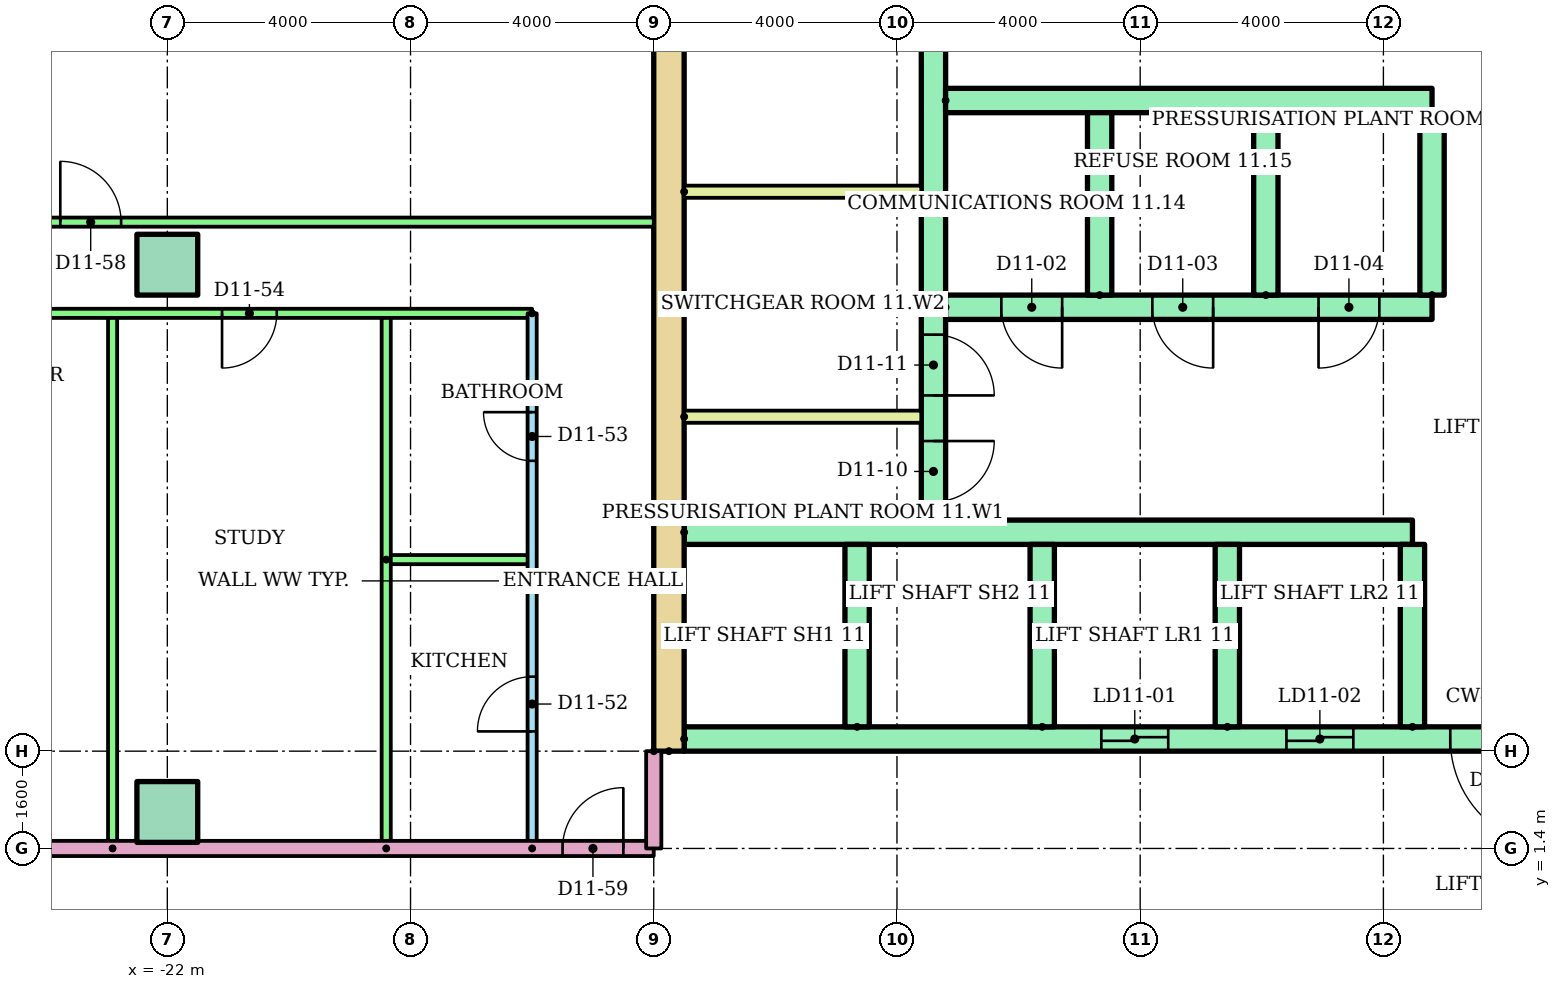
"""IFC4 building model, lengths in metres.
Left out: names, types, materials, properties, quantities, classifications, styles, units other than length and angle.
Written with IfcOpenShell. Run it as: python <this file> out.ifc"""

import sys

from ifc_helpers import new_model, si_unit, direction, frame, frame_2d, origin, origin_2d, place, context, subcontext, project, spatial, rectangle, extrude, element, fill, save


model = new_model("IFC4")
c1 = context("Model", 3, precision=1e-05, world=origin(), true_north=direction((0.0, 1.0)))
c2 = subcontext(c1, "Body", "Model", "MODEL_VIEW")
j1 = project(units=[si_unit("LENGTHUNIT", "METRE"), si_unit("PLANEANGLEUNIT", "RADIAN")], contexts=[c1])
p1 = place(None, origin())
s1 = spatial("IfcSite", under=j1, at=p1, CompositionType="ELEMENT")
p2 = place(p1, origin())
s2 = spatial("IfcBuilding", under=s1, at=p2, CompositionType="ELEMENT")
p3 = place(p2, frame((0.0, 0.0, 44.8)))
s3 = spatial("IfcBuildingStorey", under=s2, at=p3, CompositionType="ELEMENT", Elevation=44.8)
for number, where in (
    (1, (-22.0, 2.0, 0.0)),
    (2, (-22.0, 11.0, 0.0)),
):
    element("IfcColumn", number, at=place(p3, frame(where)), inside=s3, PredefinedType="COLUMN", context=c2, shape_type="SweptSolid", body=[
        extrude(rectangle(XDim=1.0, YDim=1.0, at=origin_2d()), origin(), (0.0, 0.0, 1.0), 3.2),
    ])
p4 = place(p3, frame((-13.75, 3.0, 0.0), z_axis=(0.0, 0.0, 1.0), x_axis=(0.0, 1.0, 0.0)))
e3 = element("IfcWall", 3, at=p4, inside=s3, PredefinedType="SHEAR", context=c2, shape_type="SweptSolid", body=[
    extrude(rectangle(XDim=17.0, YDim=0.5, at=frame_2d((8.5, 0.0))), origin(), (0.0, 0.0, 1.0), 2.92),
])
p5 = place(p3, frame((-9.4, 6.8, 0.0), z_axis=(0.0, 0.0, 1.0), x_axis=(0.0, 1.0, 0.0)))
e4 = element("IfcWall", 4, at=p5, inside=s3, PredefinedType="SHEAR", context=c2, shape_type="SweptSolid", body=[
    extrude(rectangle(XDim=12.7, YDim=0.4, at=frame_2d((6.35, 0.0))), origin(), (0.0, 0.0, 1.0), 2.92),
])
p6 = place(p5, frame((0.3, 0.0, 0.0)))
e5 = element("IfcOpeningElement", 5, at=p6, cuts=e4, PredefinedType="OPENING", context=c2, shape_type="SweptSolid", body=[
    extrude(rectangle(XDim=1.0, YDim=2.1, at=frame_2d((0.5, 1.05))), frame((0.0, 0.21, 0.0), z_axis=(0.0, -1.0, 0.0), x_axis=(1.0, 0.0, 0.0)), (0.0, 0.0, 1.0), 0.42),
])
p7 = place(p5, frame((2.05, 0.0, 0.0)))
e6 = element("IfcOpeningElement", 6, at=p7, cuts=e4, PredefinedType="OPENING", context=c2, shape_type="SweptSolid", body=[
    extrude(rectangle(XDim=1.0, YDim=2.1, at=frame_2d((0.5, 1.05))), frame((0.0, 0.21, 0.0), z_axis=(0.0, -1.0, 0.0), x_axis=(1.0, 0.0, 0.0)), (0.0, 0.0, 1.0), 0.42),
])
p8 = place(p5, frame((7.925, 0.0, 0.0)))
e7 = element("IfcOpeningElement", 7, at=p8, cuts=e4, PredefinedType="OPENING", context=c2, shape_type="SweptSolid", body=[
    extrude(rectangle(XDim=1.0, YDim=2.1, at=frame_2d((0.5, 1.05))), frame((0.0, 0.21, 0.0), z_axis=(0.0, -1.0, 0.0), x_axis=(1.0, 0.0, 0.0)), (0.0, 0.0, 1.0), 0.42),
])
p9 = place(p3, frame((-13.5, 3.2, 0.0)))
e8 = element("IfcWall", 8, at=p9, inside=s3, PredefinedType="SHEAR", context=c2, shape_type="SweptSolid", body=[
    extrude(rectangle(XDim=27.0, YDim=0.4, at=frame_2d((13.5, 0.0))), origin(), (0.0, 0.0, 1.0), 2.92),
])
p10 = place(p9, frame((6.861, 0.0, 0.0)))
e9 = element("IfcOpeningElement", 9, at=p10, cuts=e8, PredefinedType="OPENING", context=c2, shape_type="SweptSolid", body=[
    extrude(rectangle(XDim=1.1, YDim=2.1, at=frame_2d((0.55, 1.05))), frame((0.0, 0.21, 0.0), z_axis=(0.0, -1.0, 0.0), x_axis=(1.0, 0.0, 0.0)), (0.0, 0.0, 1.0), 0.42),
])
p11 = place(p9, frame((9.906, 0.0, 0.0)))
e10 = element("IfcOpeningElement", 10, at=p11, cuts=e8, PredefinedType="OPENING", context=c2, shape_type="SweptSolid", body=[
    extrude(rectangle(XDim=1.1, YDim=2.1, at=frame_2d((0.55, 1.05))), frame((0.0, 0.21, 0.0), z_axis=(0.0, -1.0, 0.0), x_axis=(1.0, 0.0, 0.0)), (0.0, 0.0, 1.0), 0.42),
])
p12 = place(p9, frame((15.994, 0.0, 0.0)))
e11 = element("IfcOpeningElement", 11, at=p12, cuts=e8, PredefinedType="OPENING", context=c2, shape_type="SweptSolid", body=[
    extrude(rectangle(XDim=1.1, YDim=2.1, at=frame_2d((0.55, 1.05))), frame((0.0, 0.21, 0.0), z_axis=(0.0, -1.0, 0.0), x_axis=(1.0, 0.0, 0.0)), (0.0, 0.0, 1.0), 0.42),
])
p13 = place(p9, frame((19.039, 0.0, 0.0)))
e12 = element("IfcOpeningElement", 12, at=p13, cuts=e8, PredefinedType="OPENING", context=c2, shape_type="SweptSolid", body=[
    extrude(rectangle(XDim=1.1, YDim=2.1, at=frame_2d((0.55, 1.05))), frame((0.0, 0.21, 0.0), z_axis=(0.0, -1.0, 0.0), x_axis=(1.0, 0.0, 0.0)), (0.0, 0.0, 1.0), 0.42),
])
p14 = place(p9, frame((12.6, 0.0, 0.0)))
e13 = element("IfcOpeningElement", 13, at=p14, cuts=e8, PredefinedType="OPENING", context=c2, shape_type="SweptSolid", body=[
    extrude(rectangle(XDim=1.8, YDim=2.1, at=frame_2d((0.9, 1.05))), frame((0.0, 0.21, 0.0), z_axis=(0.0, -1.0, 0.0), x_axis=(1.0, 0.0, 0.0)), (0.0, 0.0, 1.0), 0.42),
])
p15 = place(p3, frame((-13.5, 6.6, 0.0)))
e14 = element("IfcWall", 14, at=p15, inside=s3, PredefinedType="SHEAR", context=c2, shape_type="SweptSolid", body=[
    extrude(rectangle(XDim=11.978, YDim=0.4, at=frame_2d((5.989, 0.0))), origin(), (0.0, 0.0, 1.0), 2.92),
])
for number, where, z_axis, x_axis in (
    (15, (-10.656, 3.4, 0.0), (0.0, 0.0, 1.0), (0.0, 1.0, 0.0)),
    (16, (-7.611, 3.4, 0.0), (0.0, 0.0, 1.0), (0.0, 1.0, 0.0)),
    (17, (-4.567, 3.4, 0.0), (0.0, 0.0, 1.0), (0.0, 1.0, 0.0)),
    (18, (-1.522, 3.4, 0.0), (0.0, 0.0, 1.0), (0.0, 1.0, 0.0)),
):
    element("IfcWall", number, at=place(p3, frame(where, z_axis=z_axis, x_axis=x_axis)), inside=s3, PredefinedType="SHEAR", context=c2, shape_type="SweptSolid", body=[
        extrude(rectangle(XDim=3.0, YDim=0.4, at=frame_2d((1.5, 0.0))), origin(), (0.0, 0.0, 1.0), 2.92),
    ])
p16 = place(p3, frame((-9.2, 10.3, 0.0)))
e19 = element("IfcWall", 19, at=p16, inside=s3, PredefinedType="SHEAR", context=c2, shape_type="SweptSolid", body=[
    extrude(rectangle(XDim=8.0, YDim=0.4, at=frame_2d((4.0, 0.0))), origin(), (0.0, 0.0, 1.0), 2.92),
])
p17 = place(p16, frame((0.917, 0.0, 0.0)))
e20 = element("IfcOpeningElement", 20, at=p17, cuts=e19, PredefinedType="OPENING", context=c2, shape_type="SweptSolid", body=[
    extrude(rectangle(XDim=1.0, YDim=2.1, at=frame_2d((0.5, 1.05))), frame((0.0, 0.21, 0.0), z_axis=(0.0, -1.0, 0.0), x_axis=(1.0, 0.0, 0.0)), (0.0, 0.0, 1.0), 0.42),
])
p18 = place(p16, frame((3.4, 0.0, 0.0)))
e21 = element("IfcOpeningElement", 21, at=p18, cuts=e19, PredefinedType="OPENING", context=c2, shape_type="SweptSolid", body=[
    extrude(rectangle(XDim=1.0, YDim=2.1, at=frame_2d((0.5, 1.05))), frame((0.0, 0.21, 0.0), z_axis=(0.0, -1.0, 0.0), x_axis=(1.0, 0.0, 0.0)), (0.0, 0.0, 1.0), 0.42),
])
p19 = place(p16, frame((6.133, 0.0, 0.0)))
e22 = element("IfcOpeningElement", 22, at=p19, cuts=e19, PredefinedType="OPENING", context=c2, shape_type="SweptSolid", body=[
    extrude(rectangle(XDim=1.0, YDim=2.1, at=frame_2d((0.5, 1.05))), frame((0.0, 0.21, 0.0), z_axis=(0.0, -1.0, 0.0), x_axis=(1.0, 0.0, 0.0)), (0.0, 0.0, 1.0), 0.42),
])
p20 = place(p3, frame((-9.2, 13.7, 0.0)))
e23 = element("IfcWall", 23, at=p20, inside=s3, PredefinedType="SHEAR", context=c2, shape_type="SweptSolid", body=[
    extrude(rectangle(XDim=8.0, YDim=0.4, at=frame_2d((4.0, 0.0))), origin(), (0.0, 0.0, 1.0), 2.92),
])
for number, where, z_axis, x_axis in (
    (24, (-6.667, 10.5, 0.0), (0.0, 0.0, 1.0), (0.0, 1.0, 0.0)),
    (25, (-3.933, 10.5, 0.0), (0.0, 0.0, 1.0), (0.0, 1.0, 0.0)),
    (26, (-1.2, 10.5, 0.0), (0.0, 0.0, 1.0), (0.0, 1.0, 0.0)),
):
    element("IfcWall", number, at=place(p3, frame(where, z_axis=z_axis, x_axis=x_axis)), inside=s3, PredefinedType="SHEAR", context=c2, shape_type="SweptSolid", body=[
        extrude(rectangle(XDim=3.0, YDim=0.4, at=frame_2d((1.5, 0.0))), origin(), (0.0, 0.0, 1.0), 2.92),
    ])
for number, where in (
    (27, (-13.5, 8.5, 0.0)),
    (28, (-13.5, 12.2, 0.0)),
):
    element("IfcWall", number, at=place(p3, frame(where)), inside=s3, PredefinedType="PARTITIONING", context=c2, shape_type="SweptSolid", body=[
        extrude(rectangle(XDim=3.9, YDim=0.2, at=frame_2d((1.95, 0.0))), origin(), (0.0, 0.0, 1.0), 2.92),
    ])
p21 = place(p3, frame((-16.0, 1.4, 0.0), z_axis=(0.0, 0.0, 1.0), x_axis=(0.0, 1.0, 0.0)))
e29 = element("IfcWall", 29, at=p21, inside=s3, PredefinedType="PARTITIONING", context=c2, shape_type="SweptSolid", body=[
    extrude(rectangle(XDim=8.8, YDim=0.15, at=frame_2d((4.4, 0.0))), origin(), (0.0, 0.0, 1.0), 2.4),
])
p22 = place(p21, frame((1.925, 0.0, 0.0)))
e30 = element("IfcOpeningElement", 30, at=p22, cuts=e29, PredefinedType="OPENING", context=c2, shape_type="SweptSolid", body=[
    extrude(rectangle(XDim=0.9, YDim=2.1, at=frame_2d((0.45, 1.05))), frame((0.0, 0.085, 0.0), z_axis=(0.0, -1.0, 0.0), x_axis=(1.0, 0.0, 0.0)), (0.0, 0.0, 1.0), 0.17),
])
p23 = place(p21, frame((6.375, 0.0, 0.0)))
e31 = element("IfcOpeningElement", 31, at=p23, cuts=e29, PredefinedType="OPENING", context=c2, shape_type="SweptSolid", body=[
    extrude(rectangle(XDim=0.8, YDim=2.1, at=frame_2d((0.4, 1.05))), frame((0.0, 0.085, 0.0), z_axis=(0.0, -1.0, 0.0), x_axis=(1.0, 0.0, 0.0)), (0.0, 0.0, 1.0), 0.17),
])
p24 = place(p3, frame((-18.4, 6.15, 0.0)))
e32 = element("IfcWall", 32, at=p24, inside=s3, PredefinedType="PARTITIONING", context=c2, shape_type="SweptSolid", body=[
    extrude(rectangle(XDim=2.4, YDim=0.15, at=frame_2d((1.2, 0.0))), origin(), (0.0, 0.0, 1.0), 2.4),
])
for number, where, z_axis, x_axis in (
    (33, (-18.4, 1.4, 0.0), (0.0, 0.0, 1.0), (0.0, 1.0, 0.0)),
    (34, (-22.9, 1.4, 0.0), (0.0, 0.0, 1.0), (0.0, 1.0, 0.0)),
):
    element("IfcWall", number, at=place(p3, frame(where, z_axis=z_axis, x_axis=x_axis)), inside=s3, PredefinedType="PARTITIONING", context=c2, shape_type="SweptSolid", body=[
        extrude(rectangle(XDim=8.8, YDim=0.15, at=frame_2d((4.4, 0.0))), origin(), (0.0, 0.0, 1.0), 2.4),
    ])
p25 = place(p3, frame((-16.0, 10.2, 0.0), z_axis=(0.0, 0.0, 1.0), x_axis=(-1.0, 0.0, 0.0)))
e35 = element("IfcWall", 35, at=p25, inside=s3, PredefinedType="PARTITIONING", context=c2, shape_type="SweptSolid", body=[
    extrude(rectangle(XDim=20.52, YDim=0.15, at=frame_2d((10.26, 0.0))), origin(), (0.0, 0.0, 1.0), 2.4),
])
p26 = place(p25, frame((4.2, 0.0, 0.0)))
e36 = element("IfcOpeningElement", 36, at=p26, cuts=e35, PredefinedType="OPENING", context=c2, shape_type="SweptSolid", body=[
    extrude(rectangle(XDim=0.9, YDim=2.1, at=frame_2d((0.45, 1.05))), frame((0.0, 0.085, 0.0), z_axis=(0.0, -1.0, 0.0), x_axis=(1.0, 0.0, 0.0)), (0.0, 0.0, 1.0), 0.17),
])
p27 = place(p25, frame((9.45, 0.0, 0.0)))
e37 = element("IfcOpeningElement", 37, at=p27, cuts=e35, PredefinedType="OPENING", context=c2, shape_type="SweptSolid", body=[
    extrude(rectangle(XDim=0.9, YDim=2.1, at=frame_2d((0.45, 1.05))), frame((0.0, 0.085, 0.0), z_axis=(0.0, -1.0, 0.0), x_axis=(1.0, 0.0, 0.0)), (0.0, 0.0, 1.0), 0.17),
])
p28 = place(p25, frame((16.15, 0.0, 0.0)))
e38 = element("IfcOpeningElement", 38, at=p28, cuts=e35, PredefinedType="OPENING", context=c2, shape_type="SweptSolid", body=[
    extrude(rectangle(XDim=0.9, YDim=2.1, at=frame_2d((0.45, 1.05))), frame((0.0, 0.085, 0.0), z_axis=(0.0, -1.0, 0.0), x_axis=(1.0, 0.0, 0.0)), (0.0, 0.0, 1.0), 0.17),
])
p29 = place(p3, frame((-36.52, 11.7, 0.0)))
e39 = element("IfcWall", 39, at=p29, inside=s3, PredefinedType="PARTITIONING", context=c2, shape_type="SweptSolid", body=[
    extrude(rectangle(XDim=22.52, YDim=0.15, at=frame_2d((11.26, 0.0))), origin(), (0.0, 0.0, 1.0), 2.4),
])
p30 = place(p29, frame((2.02, 0.0, 0.0)))
e40 = element("IfcOpeningElement", 40, at=p30, cuts=e39, PredefinedType="OPENING", context=c2, shape_type="SweptSolid", body=[
    extrude(rectangle(XDim=0.9, YDim=2.1, at=frame_2d((0.45, 1.05))), frame((0.0, 0.085, 0.0), z_axis=(0.0, -1.0, 0.0), x_axis=(1.0, 0.0, 0.0)), (0.0, 0.0, 1.0), 0.17),
])
p31 = place(p29, frame((12.76, 0.0, 0.0)))
e41 = element("IfcOpeningElement", 41, at=p31, cuts=e39, PredefinedType="OPENING", context=c2, shape_type="SweptSolid", body=[
    extrude(rectangle(XDim=1.0, YDim=2.1, at=frame_2d((0.5, 1.05))), frame((0.0, 0.085, 0.0), z_axis=(0.0, -1.0, 0.0), x_axis=(1.0, 0.0, 0.0)), (0.0, 0.0, 1.0), 0.17),
])
p32 = place(p3, frame((-29.0, 1.4, 0.0)))
e42 = element("IfcWall", 42, at=p32, inside=s3, PredefinedType="PARTITIONING", context=c2, shape_type="SweptSolid", body=[
    extrude(rectangle(XDim=15.0, YDim=0.25, at=frame_2d((7.5, 0.0))), origin(), (0.0, 0.0, 1.0), 2.4),
])
p33 = place(p32, frame((13.5, 0.0, 0.0)))
e43 = element("IfcOpeningElement", 43, at=p33, cuts=e42, PredefinedType="OPENING", context=c2, shape_type="SweptSolid", body=[
    extrude(rectangle(XDim=1.0, YDim=2.1, at=frame_2d((0.5, 1.05))), frame((0.0, 0.135, 0.0), z_axis=(0.0, -1.0, 0.0), x_axis=(1.0, 0.0, 0.0)), (0.0, 0.0, 1.0), 0.27),
])
p34 = place(p3, frame((-14.0, 3.0, 0.0), z_axis=(0.0, 0.0, 1.0), x_axis=(0.0, -1.0, 0.0)))
e44 = element("IfcWall", 44, at=p34, inside=s3, PredefinedType="PARTITIONING", context=c2, shape_type="SweptSolid", body=[
    extrude(rectangle(XDim=1.6, YDim=0.25, at=frame_2d((0.8, 0.0))), origin(), (0.0, 0.0, 1.0), 2.4),
])
p35 = place(p10, origin())
e45 = element("IfcDoor", 45, at=p35, inside=s3, OperationType="SLIDING_TO_LEFT", PredefinedType="DOOR", context=c2, shape_type="SweptSolid", body=[
    extrude(rectangle(XDim=1.1, YDim=2.1, at=frame_2d((0.55, 1.05))), frame((0.0, 0.025, 0.0), z_axis=(0.0, -1.0, 0.0), x_axis=(1.0, 0.0, 0.0)), (0.0, 0.0, 1.0), 0.05),
])
fill(e9, e45)
p36 = place(p11, origin())
e46 = element("IfcDoor", 46, at=p36, inside=s3, OperationType="SLIDING_TO_LEFT", PredefinedType="DOOR", context=c2, shape_type="SweptSolid", body=[
    extrude(rectangle(XDim=1.1, YDim=2.1, at=frame_2d((0.55, 1.05))), frame((0.0, 0.025, 0.0), z_axis=(0.0, -1.0, 0.0), x_axis=(1.0, 0.0, 0.0)), (0.0, 0.0, 1.0), 0.05),
])
fill(e10, e46)
p37 = place(p14, frame((1.8, 0.0, 0.0), z_axis=(0.0, 0.0, 1.0), x_axis=(-1.0, 0.0, 0.0)))
e47 = element("IfcDoor", 47, at=p37, inside=s3, OperationType="DOUBLE_DOOR_SINGLE_SWING", PredefinedType="DOOR", context=c2, shape_type="SweptSolid", body=[
    extrude(rectangle(XDim=1.8, YDim=2.1, at=frame_2d((0.9, 1.05))), frame((0.0, 0.025, 0.0), z_axis=(0.0, -1.0, 0.0), x_axis=(1.0, 0.0, 0.0)), (0.0, 0.0, 1.0), 0.05),
])
fill(e13, e47)
p38 = place(p17, frame((1.0, 0.0, 0.0), z_axis=(0.0, 0.0, 1.0), x_axis=(-1.0, 0.0, 0.0)))
e48 = element("IfcDoor", 48, at=p38, inside=s3, OperationType="SINGLE_SWING_RIGHT", PredefinedType="DOOR", context=c2, shape_type="SweptSolid", body=[
    extrude(rectangle(XDim=1.0, YDim=2.1, at=frame_2d((0.5, 1.05))), frame((0.0, 0.025, 0.0), z_axis=(0.0, -1.0, 0.0), x_axis=(1.0, 0.0, 0.0)), (0.0, 0.0, 1.0), 0.05),
])
fill(e20, e48)
p39 = place(p18, frame((1.0, 0.0, 0.0), z_axis=(0.0, 0.0, 1.0), x_axis=(-1.0, 0.0, 0.0)))
e49 = element("IfcDoor", 49, at=p39, inside=s3, OperationType="SINGLE_SWING_RIGHT", PredefinedType="DOOR", context=c2, shape_type="SweptSolid", body=[
    extrude(rectangle(XDim=1.0, YDim=2.1, at=frame_2d((0.5, 1.05))), frame((0.0, 0.025, 0.0), z_axis=(0.0, -1.0, 0.0), x_axis=(1.0, 0.0, 0.0)), (0.0, 0.0, 1.0), 0.05),
])
fill(e21, e49)
p40 = place(p19, frame((1.0, 0.0, 0.0), z_axis=(0.0, 0.0, 1.0), x_axis=(-1.0, 0.0, 0.0)))
e50 = element("IfcDoor", 50, at=p40, inside=s3, OperationType="SINGLE_SWING_LEFT", PredefinedType="DOOR", context=c2, shape_type="SweptSolid", body=[
    extrude(rectangle(XDim=1.0, YDim=2.1, at=frame_2d((0.5, 1.05))), frame((0.0, 0.025, 0.0), z_axis=(0.0, -1.0, 0.0), x_axis=(1.0, 0.0, 0.0)), (0.0, 0.0, 1.0), 0.05),
])
fill(e22, e50)
p41 = place(p6, frame((1.0, 0.0, 0.0), z_axis=(0.0, 0.0, 1.0), x_axis=(-1.0, 0.0, 0.0)))
e51 = element("IfcDoor", 51, at=p41, inside=s3, OperationType="SINGLE_SWING_RIGHT", PredefinedType="DOOR", context=c2, shape_type="SweptSolid", body=[
    extrude(rectangle(XDim=1.0, YDim=2.1, at=frame_2d((0.5, 1.05))), frame((0.0, 0.025, 0.0), z_axis=(0.0, -1.0, 0.0), x_axis=(1.0, 0.0, 0.0)), (0.0, 0.0, 1.0), 0.05),
])
fill(e5, e51)
p42 = place(p7, frame((1.0, 0.0, 0.0), z_axis=(0.0, 0.0, 1.0), x_axis=(-1.0, 0.0, 0.0)))
e52 = element("IfcDoor", 52, at=p42, inside=s3, OperationType="SINGLE_SWING_LEFT", PredefinedType="DOOR", context=c2, shape_type="SweptSolid", body=[
    extrude(rectangle(XDim=1.0, YDim=2.1, at=frame_2d((0.5, 1.05))), frame((0.0, 0.025, 0.0), z_axis=(0.0, -1.0, 0.0), x_axis=(1.0, 0.0, 0.0)), (0.0, 0.0, 1.0), 0.05),
])
fill(e6, e52)
p43 = place(p22, origin())
e53 = element("IfcDoor", 53, at=p43, inside=s3, OperationType="SINGLE_SWING_LEFT", PredefinedType="DOOR", context=c2, shape_type="SweptSolid", body=[
    extrude(rectangle(XDim=0.9, YDim=2.1, at=frame_2d((0.45, 1.05))), frame((0.0, 0.025, 0.0), z_axis=(0.0, -1.0, 0.0), x_axis=(1.0, 0.0, 0.0)), (0.0, 0.0, 1.0), 0.05),
])
fill(e30, e53)
p44 = place(p23, origin())
e54 = element("IfcDoor", 54, at=p44, inside=s3, OperationType="SINGLE_SWING_RIGHT", PredefinedType="DOOR", context=c2, shape_type="SweptSolid", body=[
    extrude(rectangle(XDim=0.8, YDim=2.1, at=frame_2d((0.4, 1.05))), frame((0.0, 0.025, 0.0), z_axis=(0.0, -1.0, 0.0), x_axis=(1.0, 0.0, 0.0)), (0.0, 0.0, 1.0), 0.05),
])
fill(e31, e54)
p45 = place(p26, origin())
e55 = element("IfcDoor", 55, at=p45, inside=s3, OperationType="SINGLE_SWING_RIGHT", PredefinedType="DOOR", context=c2, shape_type="SweptSolid", body=[
    extrude(rectangle(XDim=0.9, YDim=2.1, at=frame_2d((0.45, 1.05))), frame((0.0, 0.025, 0.0), z_axis=(0.0, -1.0, 0.0), x_axis=(1.0, 0.0, 0.0)), (0.0, 0.0, 1.0), 0.05),
])
fill(e36, e55)
p46 = place(p31, origin())
e56 = element("IfcDoor", 56, at=p46, inside=s3, OperationType="SINGLE_SWING_LEFT", PredefinedType="DOOR", context=c2, shape_type="SweptSolid", body=[
    extrude(rectangle(XDim=1.0, YDim=2.1, at=frame_2d((0.5, 1.05))), frame((0.0, 0.025, 0.0), z_axis=(0.0, -1.0, 0.0), x_axis=(1.0, 0.0, 0.0)), (0.0, 0.0, 1.0), 0.05),
])
fill(e41, e56)
p47 = place(p33, origin())
e57 = element("IfcDoor", 57, at=p47, inside=s3, OperationType="SINGLE_SWING_RIGHT", PredefinedType="DOOR", context=c2, shape_type="SweptSolid", body=[
    extrude(rectangle(XDim=1.0, YDim=2.1, at=frame_2d((0.5, 1.05))), frame((0.0, 0.025, 0.0), z_axis=(0.0, -1.0, 0.0), x_axis=(1.0, 0.0, 0.0)), (0.0, 0.0, 1.0), 0.05),
])
fill(e43, e57)
save(model, sys.argv[1])
